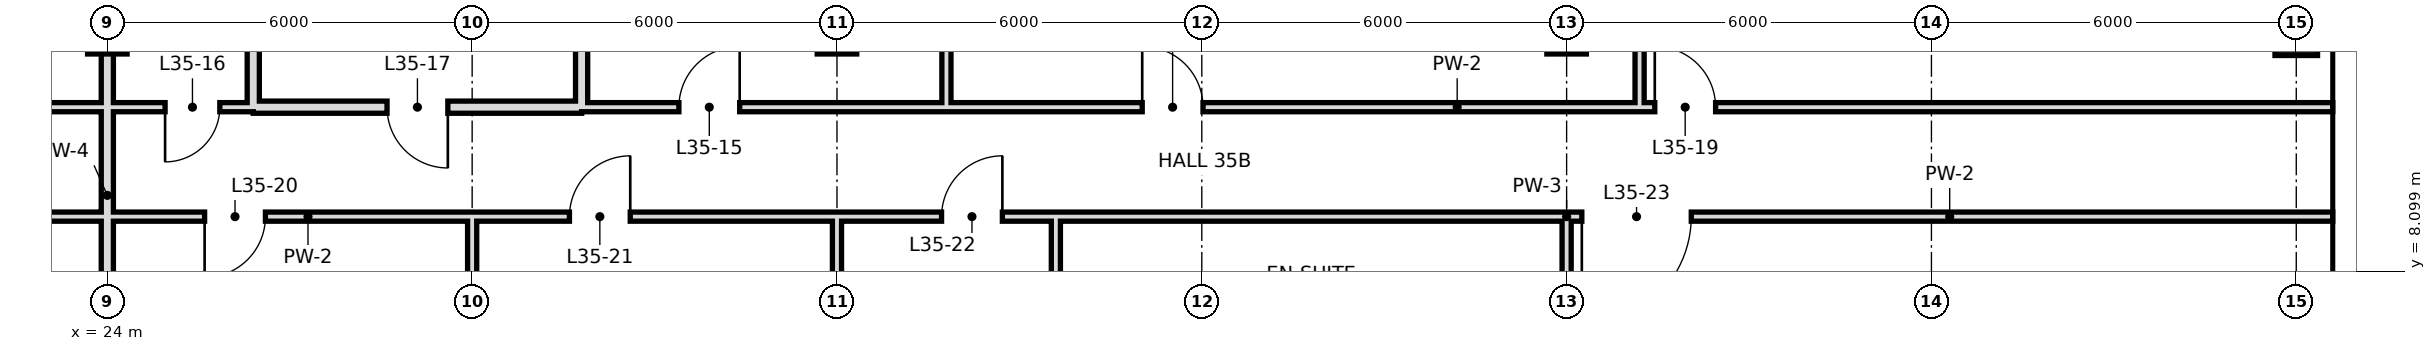
"""IFC4 building model, lengths in metres.
Left out: names, types, materials, properties, quantities, classifications, styles, units other than length and angle.
Written with IfcOpenShell. Run it as: python <this file> out.ifc"""

import sys

from ifc_helpers import new_model, si_unit, direction, frame, frame_2d, origin, origin_2d, place, context, subcontext, project, spatial, rectangle, hollow_rectangle, extrude, element, fill, save


model = new_model("IFC4")
c1 = context("Model", 3, precision=1e-05, world=origin(), true_north=direction((0.0, 1.0)))
c2 = subcontext(c1, "Body", "Model", "MODEL_VIEW")
j1 = project(units=[si_unit("LENGTHUNIT", "METRE"), si_unit("PLANEANGLEUNIT", "RADIAN")], contexts=[c1])
p1 = place(None, origin())
s1 = spatial("IfcSite", under=j1, at=p1, CompositionType="ELEMENT")
p2 = place(p1, origin())
s2 = spatial("IfcBuilding", under=s1, at=p2, CompositionType="ELEMENT")
p3 = place(p2, frame((0.0, 0.0, 154.6)))
s3 = spatial("IfcBuildingStorey", under=s2, at=p3, CompositionType="ELEMENT", Elevation=154.6)
for number, where, z_axis, x_axis in (
    (1, (24.0, 12.0, 0.0), (0.0, 0.0, 1.0), (1.0, 0.0, 0.0)),
    (2, (36.0, 12.0, 0.0), (0.0, 0.0, 1.0), (1.0, 0.0, 0.0)),
    (3, (48.0, 12.0, 0.0), (0.0, 0.0, 1.0), (1.0, 0.0, 0.0)),
):
    element("IfcColumn", number, at=place(p3, frame(where, z_axis=z_axis, x_axis=x_axis)), inside=s3, PredefinedType="COLUMN", context=c2, shape_type="SweptSolid", body=[
        extrude(hollow_rectangle(XDim=0.65, YDim=0.65, WallThickness=0.032, at=origin_2d()), origin(), (0.0, 0.0, 1.0), 3.6),
    ])
p4 = place(p3, frame((60.0, 12.0, 0.0), z_axis=(0.0, 0.0, 1.0), x_axis=(1.0, 0.0, 0.0)))
e4 = element("IfcColumn", 4, at=p4, inside=s3, PredefinedType="COLUMN", context=c2, shape_type="SweptSolid", body=[
    extrude(hollow_rectangle(XDim=0.7, YDim=0.7, WallThickness=0.036, at=origin_2d()), origin(), (0.0, 0.0, 1.0), 3.6),
])
p5 = place(p3, frame((24.0, 0.0, 0.0), z_axis=(0.0, 0.0, 1.0), x_axis=(0.0, 1.0, 0.0)))
e5 = element("IfcWall", 5, at=p5, inside=s3, PredefinedType="SOLIDWALL", context=c2, shape_type="SweptSolid", body=[
    extrude(rectangle(XDim=18.7, YDim=0.2, at=frame_2d((9.35, 0.0))), origin(), (0.0, 0.0, 1.0), 2.72),
])
p6 = place(p3, frame((26.4, 10.8, 0.0), z_axis=(0.0, 0.0, 1.0), x_axis=(0.0, 1.0, 0.0)))
e6 = element("IfcWall", 6, at=p6, inside=s3, PredefinedType="SOLIDWALL", context=c2, shape_type="SweptSolid", body=[
    extrude(rectangle(XDim=7.9, YDim=0.2, at=frame_2d((3.95, 0.0))), origin(), (0.0, 0.0, 1.0), 2.72),
])
p7 = place(p3, frame((30.0, -0.6, 0.0), z_axis=(0.0, 0.0, 1.0), x_axis=(0.0, 1.0, 0.0)))
e7 = element("IfcWall", 7, at=p7, inside=s3, PredefinedType="PARTITIONING", context=c2, shape_type="SweptSolid", body=[
    extrude(rectangle(XDim=9.6, YDim=0.15, at=frame_2d((4.8, 0.0))), origin(), (0.0, 0.0, 1.0), 2.72),
])
p8 = place(p3, frame((31.8, 10.8, 0.0), z_axis=(0.0, 0.0, 1.0), x_axis=(0.0, 1.0, 0.0)))
e8 = element("IfcWall", 8, at=p8, inside=s3, PredefinedType="SOLIDWALL", context=c2, shape_type="SweptSolid", body=[
    extrude(rectangle(XDim=7.9, YDim=0.2, at=frame_2d((3.95, 0.0))), origin(), (0.0, 0.0, 1.0), 3.42),
])
p9 = place(p3, frame((36.0, 0.0, 0.0), z_axis=(0.0, 0.0, 1.0), x_axis=(0.0, 1.0, 0.0)))
e9 = element("IfcWall", 9, at=p9, inside=s3, PredefinedType="PARTITIONING", context=c2, shape_type="SweptSolid", body=[
    extrude(rectangle(XDim=9.0, YDim=0.15, at=frame_2d((4.5, 0.0))), origin(), (0.0, 0.0, 1.0), 2.72),
])
p10 = place(p3, frame((37.8, 10.8, 0.0), z_axis=(0.0, 0.0, 1.0), x_axis=(0.0, 1.0, 0.0)))
e10 = element("IfcWall", 10, at=p10, inside=s3, PredefinedType="PARTITIONING", context=c2, shape_type="SweptSolid", body=[
    extrude(rectangle(XDim=7.9, YDim=0.15, at=frame_2d((3.95, 0.0))), origin(), (0.0, 0.0, 1.0), 3.42),
])
p11 = place(p3, frame((39.6, 6.0, 0.0), z_axis=(0.0, 0.0, 1.0), x_axis=(0.0, 1.0, 0.0)))
e11 = element("IfcWall", 11, at=p11, inside=s3, PredefinedType="PARTITIONING", context=c2, shape_type="SweptSolid", body=[
    extrude(rectangle(XDim=3.0, YDim=0.15, at=frame_2d((1.5, 0.0))), origin(), (0.0, 0.0, 1.0), 3.42),
])
p12 = place(p3, frame((48.0, 6.0, 0.0), z_axis=(0.0, 0.0, 1.0), x_axis=(0.0, 1.0, 0.0)))
e12 = element("IfcWall", 12, at=p12, inside=s3, PredefinedType="PARTITIONING", context=c2, shape_type="SweptSolid", body=[
    extrude(rectangle(XDim=3.0, YDim=0.15, at=frame_2d((1.5, 0.0))), origin(), (0.0, 0.0, 1.0), 2.72),
])
p13 = place(p3, frame((49.2, 10.8, 0.0), z_axis=(0.0, 0.0, 1.0), x_axis=(0.0, 1.0, 0.0)))
e13 = element("IfcWall", 13, at=p13, inside=s3, PredefinedType="PARTITIONING", context=c2, shape_type="SweptSolid", body=[
    extrude(rectangle(XDim=16.2, YDim=0.15, at=frame_2d((8.1, 0.0))), origin(), (0.0, 0.0, 1.0), 3.42),
])
p14 = place(p13, frame((11.2, 0.0, 0.0)))
e14 = element("IfcOpeningElement", 14, at=p14, cuts=e13, PredefinedType="OPENING", context=c2, shape_type="SweptSolid", body=[
    extrude(rectangle(XDim=1.0, YDim=2.4, at=frame_2d((0.5, 1.2))), frame((0.0, 0.085, 0.0), z_axis=(0.0, -1.0, 0.0), x_axis=(1.0, 0.0, 0.0)), (0.0, 0.0, 1.0), 0.17),
])
p15 = place(p3, frame((26.4, 10.8, 0.0), z_axis=(0.0, 0.0, 1.0), x_axis=(1.0, 0.0, 0.0)))
e15 = element("IfcWall", 15, at=p15, inside=s3, PredefinedType="SOLIDWALL", context=c2, shape_type="SweptSolid", body=[
    extrude(rectangle(XDim=5.4, YDim=0.2, at=frame_2d((2.7, 0.0))), origin(), (0.0, 0.0, 1.0), 2.72),
])
p16 = place(p15, frame((2.2, 0.0, 0.0)))
e16 = element("IfcOpeningElement", 16, at=p16, cuts=e15, PredefinedType="OPENING", context=c2, shape_type="SweptSolid", body=[
    extrude(rectangle(XDim=1.0, YDim=2.4, at=frame_2d((0.5, 1.2))), frame((0.0, 0.11, 0.0), z_axis=(0.0, -1.0, 0.0), x_axis=(1.0, 0.0, 0.0)), (0.0, 0.0, 1.0), 0.22),
])
p17 = place(p3, frame((19.2, 10.8, 0.0), z_axis=(0.0, 0.0, 1.0), x_axis=(1.0, 0.0, 0.0)))
e17 = element("IfcWall", 17, at=p17, inside=s3, PredefinedType="PARTITIONING", context=c2, shape_type="SweptSolid", body=[
    extrude(rectangle(XDim=4.8, YDim=0.15, at=frame_2d((2.4, 0.0))), origin(), (0.0, 0.0, 1.0), 3.42),
])
p18 = place(p17, frame((1.9, 0.0, 0.0)))
e18 = element("IfcOpeningElement", 18, at=p18, cuts=e17, PredefinedType="OPENING", context=c2, shape_type="SweptSolid", body=[
    extrude(rectangle(XDim=1.0, YDim=2.4, at=frame_2d((0.5, 1.2))), frame((0.0, 0.085, 0.0), z_axis=(0.0, -1.0, 0.0), x_axis=(1.0, 0.0, 0.0)), (0.0, 0.0, 1.0), 0.17),
])
p19 = place(p3, frame((31.8, 10.8, 0.0), z_axis=(0.0, 0.0, 1.0), x_axis=(1.0, 0.0, 0.0)))
e19 = element("IfcWall", 19, at=p19, inside=s3, PredefinedType="PARTITIONING", context=c2, shape_type="SweptSolid", body=[
    extrude(rectangle(XDim=28.8, YDim=0.15, at=frame_2d((14.4, 0.0))), origin(), (0.0, 0.0, 1.0), 3.42),
])
p20 = place(p19, frame((1.6, 0.0, 0.0)))
e20 = element("IfcOpeningElement", 20, at=p20, cuts=e19, PredefinedType="OPENING", context=c2, shape_type="SweptSolid", body=[
    extrude(rectangle(XDim=1.0, YDim=2.4, at=frame_2d((0.5, 1.2))), frame((0.0, 0.085, 0.0), z_axis=(0.0, -1.0, 0.0), x_axis=(1.0, 0.0, 0.0)), (0.0, 0.0, 1.0), 0.17),
])
p21 = place(p19, frame((9.22, 0.0, 0.0)))
e21 = element("IfcOpeningElement", 21, at=p21, cuts=e19, PredefinedType="OPENING", context=c2, shape_type="SweptSolid", body=[
    extrude(rectangle(XDim=1.0, YDim=2.4, at=frame_2d((0.5, 1.2))), frame((0.0, 0.085, 0.0), z_axis=(0.0, -1.0, 0.0), x_axis=(1.0, 0.0, 0.0)), (0.0, 0.0, 1.0), 0.17),
])
p22 = place(p19, frame((17.65, 0.0, 0.0)))
e22 = element("IfcOpeningElement", 22, at=p22, cuts=e19, PredefinedType="OPENING", context=c2, shape_type="SweptSolid", body=[
    extrude(rectangle(XDim=1.0, YDim=2.4, at=frame_2d((0.5, 1.2))), frame((0.0, 0.085, 0.0), z_axis=(0.0, -1.0, 0.0), x_axis=(1.0, 0.0, 0.0)), (0.0, 0.0, 1.0), 0.17),
])
p23 = place(p3, frame((24.0, 10.8, 0.0), z_axis=(0.0, 0.0, 1.0), x_axis=(1.0, 0.0, 0.0)))
e23 = element("IfcWall", 23, at=p23, inside=s3, PredefinedType="PARTITIONING", context=c2, shape_type="SweptSolid", body=[
    extrude(rectangle(XDim=2.4, YDim=0.15, at=frame_2d((1.2, 0.0))), origin(), (0.0, 0.0, 1.0), 3.42),
])
p24 = place(p23, frame((0.95, 0.0, 0.0)))
e24 = element("IfcOpeningElement", 24, at=p24, cuts=e23, PredefinedType="OPENING", context=c2, shape_type="SweptSolid", body=[
    extrude(rectangle(XDim=0.9, YDim=2.4, at=frame_2d((0.45, 1.2))), frame((0.0, 0.085, 0.0), z_axis=(0.0, -1.0, 0.0), x_axis=(1.0, 0.0, 0.0)), (0.0, 0.0, 1.0), 0.17),
])
p25 = place(p3, frame((15.0, 9.0, 0.0), z_axis=(0.0, 0.0, 1.0), x_axis=(1.0, 0.0, 0.0)))
e25 = element("IfcWall", 25, at=p25, inside=s3, PredefinedType="PARTITIONING", context=c2, shape_type="SweptSolid", body=[
    extrude(rectangle(XDim=24.6, YDim=0.15, at=frame_2d((12.3, 0.0))), origin(), (0.0, 0.0, 1.0), 3.42),
])
p26 = place(p25, frame((1.3, 0.0, 0.0)))
e26 = element("IfcOpeningElement", 26, at=p26, cuts=e25, PredefinedType="OPENING", context=c2, shape_type="SweptSolid", body=[
    extrude(rectangle(XDim=1.0, YDim=2.4, at=frame_2d((0.5, 1.2))), frame((0.0, 0.085, 0.0), z_axis=(0.0, -1.0, 0.0), x_axis=(1.0, 0.0, 0.0)), (0.0, 0.0, 1.0), 0.17),
])
p27 = place(p25, frame((5.84, 0.0, 0.0)))
e27 = element("IfcOpeningElement", 27, at=p27, cuts=e25, PredefinedType="OPENING", context=c2, shape_type="SweptSolid", body=[
    extrude(rectangle(XDim=1.8, YDim=2.4, at=frame_2d((0.9, 1.2))), frame((0.0, 0.085, 0.0), z_axis=(0.0, -1.0, 0.0), x_axis=(1.0, 0.0, 0.0)), (0.0, 0.0, 1.0), 0.17),
])
p28 = place(p25, frame((10.6, 0.0, 0.0)))
e28 = element("IfcOpeningElement", 28, at=p28, cuts=e25, PredefinedType="OPENING", context=c2, shape_type="SweptSolid", body=[
    extrude(rectangle(XDim=1.0, YDim=2.4, at=frame_2d((0.5, 1.2))), frame((0.0, 0.085, 0.0), z_axis=(0.0, -1.0, 0.0), x_axis=(1.0, 0.0, 0.0)), (0.0, 0.0, 1.0), 0.17),
])
p29 = place(p25, frame((16.6, 0.0, 0.0)))
e29 = element("IfcOpeningElement", 29, at=p29, cuts=e25, PredefinedType="OPENING", context=c2, shape_type="SweptSolid", body=[
    extrude(rectangle(XDim=1.0, YDim=2.4, at=frame_2d((0.5, 1.2))), frame((0.0, 0.085, 0.0), z_axis=(0.0, -1.0, 0.0), x_axis=(1.0, 0.0, 0.0)), (0.0, 0.0, 1.0), 0.17),
])
p30 = place(p25, frame((22.72, 0.0, 0.0)))
e30 = element("IfcOpeningElement", 30, at=p30, cuts=e25, PredefinedType="OPENING", context=c2, shape_type="SweptSolid", body=[
    extrude(rectangle(XDim=1.0, YDim=2.4, at=frame_2d((0.5, 1.2))), frame((0.0, 0.085, 0.0), z_axis=(0.0, -1.0, 0.0), x_axis=(1.0, 0.0, 0.0)), (0.0, 0.0, 1.0), 0.17),
])
p31 = place(p3, frame((48.0, 9.0, 0.0), z_axis=(0.0, 0.0, 1.0), x_axis=(1.0, 0.0, 0.0)))
e31 = element("IfcWall", 31, at=p31, inside=s3, PredefinedType="PARTITIONING", context=c2, shape_type="SweptSolid", body=[
    extrude(rectangle(XDim=12.6, YDim=0.15, at=frame_2d((6.3, 0.0))), origin(), (0.0, 0.0, 1.0), 3.42),
])
p32 = place(p31, frame((0.25, 0.0, 0.0)))
e32 = element("IfcOpeningElement", 32, at=p32, cuts=e31, PredefinedType="OPENING", context=c2, shape_type="SweptSolid", body=[
    extrude(rectangle(XDim=1.8, YDim=2.4, at=frame_2d((0.9, 1.2))), frame((0.0, 0.085, 0.0), z_axis=(0.0, -1.0, 0.0), x_axis=(1.0, 0.0, 0.0)), (0.0, 0.0, 1.0), 0.17),
])
p33 = place(p3, frame((39.6, 9.0, 0.0), z_axis=(0.0, 0.0, 1.0), x_axis=(1.0, 0.0, 0.0)))
e33 = element("IfcWall", 33, at=p33, inside=s3, PredefinedType="PARTITIONING", context=c2, shape_type="SweptSolid", body=[
    extrude(rectangle(XDim=8.4, YDim=0.15, at=frame_2d((4.2, 0.0))), origin(), (0.0, 0.0, 1.0), 3.42),
])
p34 = place(p20, frame((1.0, 0.0, 0.0), z_axis=(0.0, 0.0, 1.0), x_axis=(-1.0, 0.0, 0.0)))
e34 = element("IfcDoor", 34, at=p34, inside=s3, OperationType="SINGLE_SWING_LEFT", PredefinedType="DOOR", context=c2, shape_type="SweptSolid", body=[
    extrude(rectangle(XDim=1.0, YDim=2.4, at=frame_2d((0.5, 1.2))), frame((0.0, 0.025, 0.0), z_axis=(0.0, -1.0, 0.0), x_axis=(1.0, 0.0, 0.0)), (0.0, 0.0, 1.0), 0.05),
])
fill(e20, e34)
p35 = place(p24, frame((0.9, 0.0, 0.0), z_axis=(0.0, 0.0, 1.0), x_axis=(-1.0, 0.0, 0.0)))
e35 = element("IfcDoor", 35, at=p35, inside=s3, OperationType="SINGLE_SWING_RIGHT", PredefinedType="DOOR", context=c2, shape_type="SweptSolid", body=[
    extrude(rectangle(XDim=0.9, YDim=2.4, at=frame_2d((0.45, 1.2))), frame((0.0, 0.025, 0.0), z_axis=(0.0, -1.0, 0.0), x_axis=(1.0, 0.0, 0.0)), (0.0, 0.0, 1.0), 0.05),
])
fill(e24, e35)
p36 = place(p16, origin())
e36 = element("IfcDoor", 36, at=p36, inside=s3, OperationType="SINGLE_SWING_RIGHT", PredefinedType="DOOR", context=c2, shape_type="SweptSolid", body=[
    extrude(rectangle(XDim=1.0, YDim=2.4, at=frame_2d((0.5, 1.2))), frame((0.0, 0.025, 0.0), z_axis=(0.0, -1.0, 0.0), x_axis=(1.0, 0.0, 0.0)), (0.0, 0.0, 1.0), 0.05),
])
fill(e16, e36)
p37 = place(p21, origin())
e37 = element("IfcDoor", 37, at=p37, inside=s3, OperationType="SINGLE_SWING_LEFT", PredefinedType="DOOR", context=c2, shape_type="SweptSolid", body=[
    extrude(rectangle(XDim=1.0, YDim=2.4, at=frame_2d((0.5, 1.2))), frame((0.0, 0.025, 0.0), z_axis=(0.0, -1.0, 0.0), x_axis=(1.0, 0.0, 0.0)), (0.0, 0.0, 1.0), 0.05),
])
fill(e21, e37)
p38 = place(p22, origin())
e38 = element("IfcDoor", 38, at=p38, inside=s3, OperationType="SINGLE_SWING_LEFT", PredefinedType="DOOR", context=c2, shape_type="SweptSolid", body=[
    extrude(rectangle(XDim=1.0, YDim=2.4, at=frame_2d((0.5, 1.2))), frame((0.0, 0.025, 0.0), z_axis=(0.0, -1.0, 0.0), x_axis=(1.0, 0.0, 0.0)), (0.0, 0.0, 1.0), 0.05),
])
fill(e22, e38)
p39 = place(p28, frame((1.0, 0.0, 0.0), z_axis=(0.0, 0.0, 1.0), x_axis=(-1.0, 0.0, 0.0)))
e39 = element("IfcDoor", 39, at=p39, inside=s3, OperationType="SINGLE_SWING_RIGHT", PredefinedType="DOOR", context=c2, shape_type="SweptSolid", body=[
    extrude(rectangle(XDim=1.0, YDim=2.4, at=frame_2d((0.5, 1.2))), frame((0.0, 0.025, 0.0), z_axis=(0.0, -1.0, 0.0), x_axis=(1.0, 0.0, 0.0)), (0.0, 0.0, 1.0), 0.05),
])
fill(e28, e39)
p40 = place(p29, frame((1.0, 0.0, 0.0), z_axis=(0.0, 0.0, 1.0), x_axis=(-1.0, 0.0, 0.0)))
e40 = element("IfcDoor", 40, at=p40, inside=s3, OperationType="SINGLE_SWING_LEFT", PredefinedType="DOOR", context=c2, shape_type="SweptSolid", body=[
    extrude(rectangle(XDim=1.0, YDim=2.4, at=frame_2d((0.5, 1.2))), frame((0.0, 0.025, 0.0), z_axis=(0.0, -1.0, 0.0), x_axis=(1.0, 0.0, 0.0)), (0.0, 0.0, 1.0), 0.05),
])
fill(e29, e40)
p41 = place(p30, frame((1.0, 0.0, 0.0), z_axis=(0.0, 0.0, 1.0), x_axis=(-1.0, 0.0, 0.0)))
e41 = element("IfcDoor", 41, at=p41, inside=s3, OperationType="SINGLE_SWING_LEFT", PredefinedType="DOOR", context=c2, shape_type="SweptSolid", body=[
    extrude(rectangle(XDim=1.0, YDim=2.4, at=frame_2d((0.5, 1.2))), frame((0.0, 0.025, 0.0), z_axis=(0.0, -1.0, 0.0), x_axis=(1.0, 0.0, 0.0)), (0.0, 0.0, 1.0), 0.05),
])
fill(e30, e41)
p42 = place(p32, frame((1.8, 0.0, 0.0), z_axis=(0.0, 0.0, 1.0), x_axis=(-1.0, 0.0, 0.0)))
e42 = element("IfcDoor", 42, at=p42, inside=s3, OperationType="SINGLE_SWING_RIGHT", PredefinedType="DOOR", context=c2, shape_type="SweptSolid", body=[
    extrude(rectangle(XDim=1.8, YDim=2.4, at=frame_2d((0.9, 1.2))), frame((0.0, 0.025, 0.0), z_axis=(0.0, -1.0, 0.0), x_axis=(1.0, 0.0, 0.0)), (0.0, 0.0, 1.0), 0.05),
])
fill(e32, e42)
save(model, sys.argv[1])
